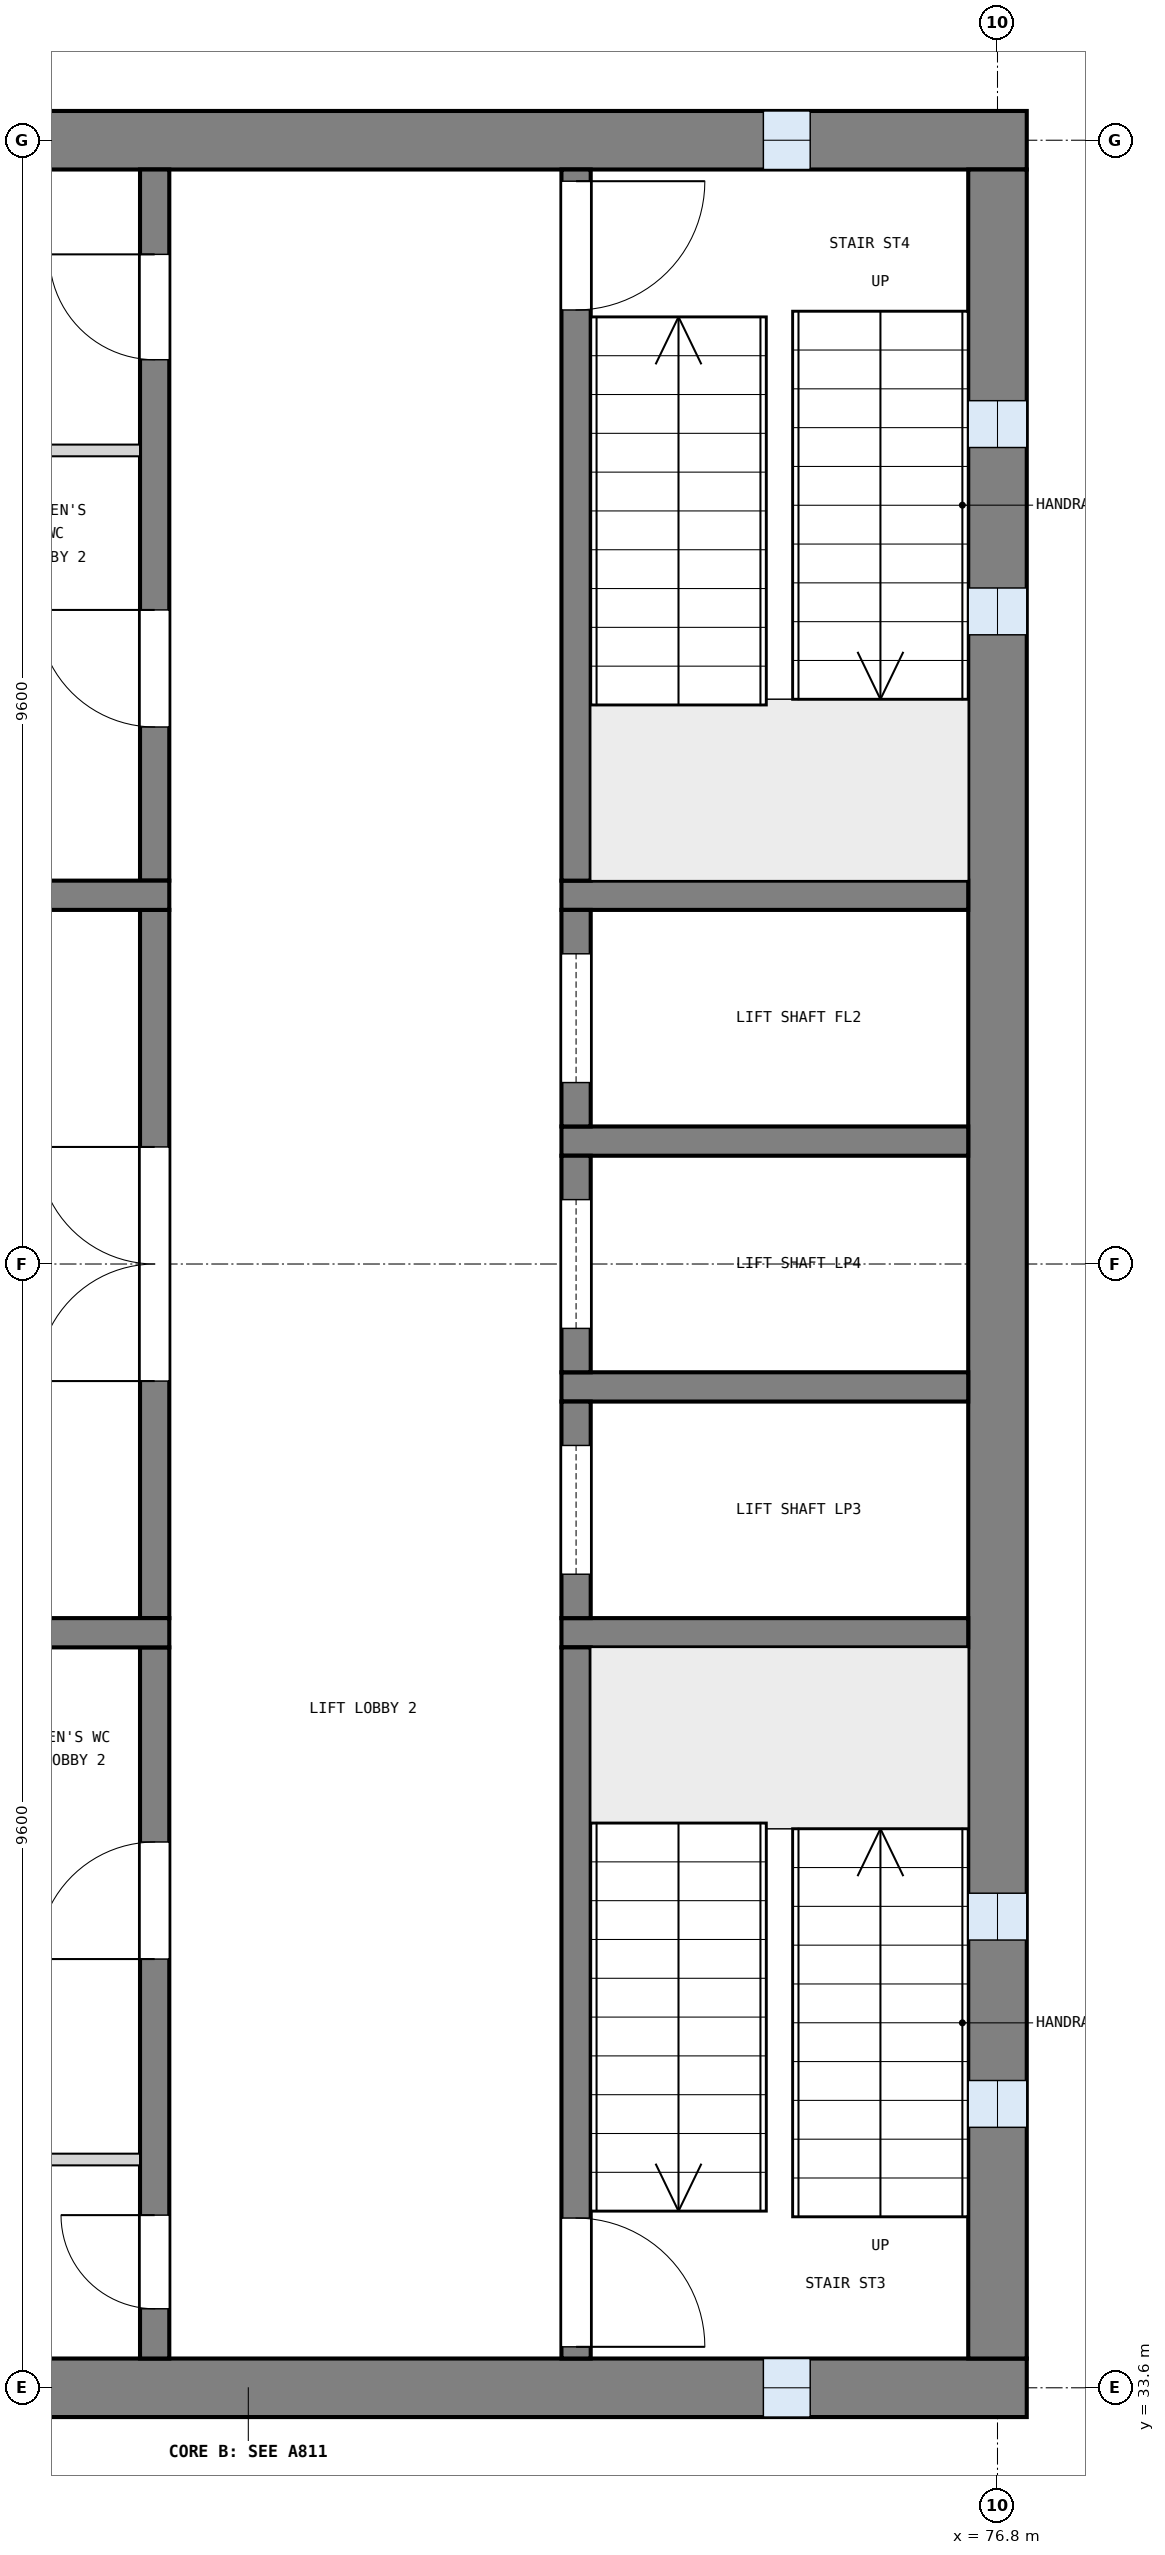
"""IFC4 building model, lengths in metres.
Left out: names, types, materials, properties, quantities, classifications, styles, units other than length and angle.
Written with IfcOpenShell. Run it as: python <this file> out.ifc"""

import sys

from ifc_helpers import new_model, si_unit, direction, frame, frame_2d, origin, place, context, subcontext, project, spatial, rectangle, extrude, element, fill, save


model = new_model("IFC4")
c1 = context("Model", 3, precision=1e-05, world=origin(), true_north=direction((0.0, 1.0)))
c2 = subcontext(c1, "Body", "Model", "MODEL_VIEW")
j1 = project(units=[si_unit("LENGTHUNIT", "METRE"), si_unit("PLANEANGLEUNIT", "RADIAN")], contexts=[c1])
p1 = place(None, origin())
s1 = spatial("IfcSite", under=j1, at=p1, CompositionType="ELEMENT")
p2 = place(p1, origin())
s2 = spatial("IfcBuilding", under=s1, at=p2, CompositionType="ELEMENT")
p3 = place(p2, frame((0.0, 0.0, 36.6)))
s3 = spatial("IfcBuildingStorey", under=s2, at=p3, CompositionType="ELEMENT", Elevation=36.6)
p4 = place(p3, frame((63.75, 52.8, 0.0), z_axis=(0.0, 0.0, 1.0), x_axis=(1.0, 0.0, 0.0)))
e1 = element("IfcWall", 1, at=p4, inside=s3, PredefinedType="SHEAR", context=c2, shape_type="SweptSolid", body=[
    extrude(rectangle(XDim=13.3, YDim=0.5, at=frame_2d((6.65, 0.0))), origin(), (0.0, 0.0, 1.0), 3.9),
])
p5 = place(p4, frame((11.05, 0.0, 1.0)))
e2 = element("IfcOpeningElement", 2, at=p5, cuts=e1, PredefinedType="OPENING", context=c2, shape_type="SweptSolid", body=[
    extrude(rectangle(XDim=0.4, YDim=2.0, at=frame_2d((0.2, 1.0))), frame((0.0, 0.26, 0.0), z_axis=(0.0, -1.0, 0.0), x_axis=(1.0, 0.0, 0.0)), (0.0, 0.0, 1.0), 0.52),
])
p6 = place(p3, frame((63.75, 33.6, 0.0), z_axis=(0.0, 0.0, 1.0), x_axis=(1.0, 0.0, 0.0)))
e3 = element("IfcWall", 3, at=p6, inside=s3, PredefinedType="SHEAR", context=c2, shape_type="SweptSolid", body=[
    extrude(rectangle(XDim=13.3, YDim=0.5, at=frame_2d((6.65, 0.0))), origin(), (0.0, 0.0, 1.0), 3.9),
])
p7 = place(p6, frame((11.05, 0.0, 1.0)))
e4 = element("IfcOpeningElement", 4, at=p7, cuts=e3, PredefinedType="OPENING", context=c2, shape_type="SweptSolid", body=[
    extrude(rectangle(XDim=0.4, YDim=2.0, at=frame_2d((0.2, 1.0))), frame((0.0, 0.26, 0.0), z_axis=(0.0, -1.0, 0.0), x_axis=(1.0, 0.0, 0.0)), (0.0, 0.0, 1.0), 0.52),
])
p8 = place(p3, frame((76.8, 33.85, 0.0), z_axis=(0.0, 0.0, 1.0), x_axis=(0.0, 1.0, 0.0)))
e5 = element("IfcWall", 5, at=p8, inside=s3, PredefinedType="SHEAR", context=c2, shape_type="SweptSolid", body=[
    extrude(rectangle(XDim=18.7, YDim=0.5, at=frame_2d((9.35, 0.0))), origin(), (0.0, 0.0, 1.0), 3.9),
])
p9 = place(p8, frame((1.975, 0.0, 1.0)))
e6 = element("IfcOpeningElement", 6, at=p9, cuts=e5, PredefinedType="OPENING", context=c2, shape_type="SweptSolid", body=[
    extrude(rectangle(XDim=0.4, YDim=2.0, at=frame_2d((0.2, 1.0))), frame((0.0, 0.26, 0.0), z_axis=(0.0, -1.0, 0.0), x_axis=(1.0, 0.0, 0.0)), (0.0, 0.0, 1.0), 0.52),
])
p10 = place(p8, frame((3.575, 0.0, 1.0)))
e7 = element("IfcOpeningElement", 7, at=p10, cuts=e5, PredefinedType="OPENING", context=c2, shape_type="SweptSolid", body=[
    extrude(rectangle(XDim=0.4, YDim=2.0, at=frame_2d((0.2, 1.0))), frame((0.0, 0.26, 0.0), z_axis=(0.0, -1.0, 0.0), x_axis=(1.0, 0.0, 0.0)), (0.0, 0.0, 1.0), 0.52),
])
p11 = place(p8, frame((14.725, 0.0, 1.0)))
e8 = element("IfcOpeningElement", 8, at=p11, cuts=e5, PredefinedType="OPENING", context=c2, shape_type="SweptSolid", body=[
    extrude(rectangle(XDim=0.4, YDim=2.0, at=frame_2d((0.2, 1.0))), frame((0.0, 0.26, 0.0), z_axis=(0.0, -1.0, 0.0), x_axis=(1.0, 0.0, 0.0)), (0.0, 0.0, 1.0), 0.52),
])
p12 = place(p8, frame((16.325, 0.0, 1.0)))
e9 = element("IfcOpeningElement", 9, at=p12, cuts=e5, PredefinedType="OPENING", context=c2, shape_type="SweptSolid", body=[
    extrude(rectangle(XDim=0.4, YDim=2.0, at=frame_2d((0.2, 1.0))), frame((0.0, 0.26, 0.0), z_axis=(0.0, -1.0, 0.0), x_axis=(1.0, 0.0, 0.0)), (0.0, 0.0, 1.0), 0.52),
])
for number, where, z_axis, x_axis in (
    (10, (76.55, 40.05, 0.0), (0.0, 0.0, 1.0), (-1.0, 0.0, 0.0)),
    (11, (76.55, 42.15, 0.0), (0.0, 0.0, 1.0), (-1.0, 0.0, 0.0)),
    (12, (76.55, 44.25, 0.0), (0.0, 0.0, 1.0), (-1.0, 0.0, 0.0)),
    (13, (76.55, 46.35, 0.0), (0.0, 0.0, 1.0), (-1.0, 0.0, 0.0)),
):
    element("IfcWall", number, at=place(p3, frame(where, z_axis=z_axis, x_axis=x_axis)), inside=s3, PredefinedType="SOLIDWALL", context=c2, shape_type="SweptSolid", body=[
        extrude(rectangle(XDim=3.475, YDim=0.25, at=frame_2d((1.738, 0.0))), origin(), (0.0, 0.0, 1.0), 3.6),
    ])
p13 = place(p3, frame((73.2, 33.85, 0.0), z_axis=(0.0, 0.0, 1.0), x_axis=(0.0, 1.0, 0.0)))
e14 = element("IfcWall", 14, at=p13, inside=s3, PredefinedType="SOLIDWALL", context=c2, shape_type="SweptSolid", body=[
    extrude(rectangle(XDim=6.075, YDim=0.25, at=frame_2d((3.038, 0.0))), origin(), (0.0, 0.0, 1.0), 3.6),
])
p14 = place(p13, frame((0.1, 0.0, 0.0)))
e15 = element("IfcOpeningElement", 15, at=p14, cuts=e14, PredefinedType="OPENING", context=c2, shape_type="SweptSolid", body=[
    extrude(rectangle(XDim=1.1, YDim=2.1, at=frame_2d((0.55, 1.05))), frame((0.0, 0.135, 0.0), z_axis=(0.0, -1.0, 0.0), x_axis=(1.0, 0.0, 0.0)), (0.0, 0.0, 1.0), 0.27),
])
p15 = place(p3, frame((73.2, 40.175, 0.0), z_axis=(0.0, 0.0, 1.0), x_axis=(0.0, 1.0, 0.0)))
e16 = element("IfcWall", 16, at=p15, inside=s3, PredefinedType="SOLIDWALL", context=c2, shape_type="SweptSolid", body=[
    extrude(rectangle(XDim=1.85, YDim=0.25, at=frame_2d((0.925, 0.0))), origin(), (0.0, 0.0, 1.0), 3.6),
])
p16 = place(p15, frame((0.375, 0.0, 0.0)))
e17 = element("IfcOpeningElement", 17, at=p16, cuts=e16, PredefinedType="OPENING", context=c2, shape_type="SweptSolid", body=[
    extrude(rectangle(XDim=1.1, YDim=2.1, at=frame_2d((0.55, 1.05))), frame((0.0, 0.135, 0.0), z_axis=(0.0, -1.0, 0.0), x_axis=(1.0, 0.0, 0.0)), (0.0, 0.0, 1.0), 0.27),
])
p17 = place(p3, frame((73.2, 42.275, 0.0), z_axis=(0.0, 0.0, 1.0), x_axis=(0.0, 1.0, 0.0)))
e18 = element("IfcWall", 18, at=p17, inside=s3, PredefinedType="SOLIDWALL", context=c2, shape_type="SweptSolid", body=[
    extrude(rectangle(XDim=1.85, YDim=0.25, at=frame_2d((0.925, 0.0))), origin(), (0.0, 0.0, 1.0), 3.6),
])
p18 = place(p17, frame((0.375, 0.0, 0.0)))
e19 = element("IfcOpeningElement", 19, at=p18, cuts=e18, PredefinedType="OPENING", context=c2, shape_type="SweptSolid", body=[
    extrude(rectangle(XDim=1.1, YDim=2.1, at=frame_2d((0.55, 1.05))), frame((0.0, 0.135, 0.0), z_axis=(0.0, -1.0, 0.0), x_axis=(1.0, 0.0, 0.0)), (0.0, 0.0, 1.0), 0.27),
])
p19 = place(p3, frame((73.2, 44.375, 0.0), z_axis=(0.0, 0.0, 1.0), x_axis=(0.0, 1.0, 0.0)))
e20 = element("IfcWall", 20, at=p19, inside=s3, PredefinedType="SOLIDWALL", context=c2, shape_type="SweptSolid", body=[
    extrude(rectangle(XDim=1.85, YDim=0.25, at=frame_2d((0.925, 0.0))), origin(), (0.0, 0.0, 1.0), 3.6),
])
p20 = place(p19, frame((0.375, 0.0, 0.0)))
e21 = element("IfcOpeningElement", 21, at=p20, cuts=e20, PredefinedType="OPENING", context=c2, shape_type="SweptSolid", body=[
    extrude(rectangle(XDim=1.1, YDim=2.1, at=frame_2d((0.55, 1.05))), frame((0.0, 0.135, 0.0), z_axis=(0.0, -1.0, 0.0), x_axis=(1.0, 0.0, 0.0)), (0.0, 0.0, 1.0), 0.27),
])
p21 = place(p3, frame((73.2, 46.475, 0.0), z_axis=(0.0, 0.0, 1.0), x_axis=(0.0, 1.0, 0.0)))
e22 = element("IfcWall", 22, at=p21, inside=s3, PredefinedType="SOLIDWALL", context=c2, shape_type="SweptSolid", body=[
    extrude(rectangle(XDim=6.075, YDim=0.25, at=frame_2d((3.038, 0.0))), origin(), (0.0, 0.0, 1.0), 3.6),
])
p22 = place(p21, frame((4.875, 0.0, 0.0)))
e23 = element("IfcOpeningElement", 23, at=p22, cuts=e22, PredefinedType="OPENING", context=c2, shape_type="SweptSolid", body=[
    extrude(rectangle(XDim=1.1, YDim=2.1, at=frame_2d((0.55, 1.05))), frame((0.0, 0.135, 0.0), z_axis=(0.0, -1.0, 0.0), x_axis=(1.0, 0.0, 0.0)), (0.0, 0.0, 1.0), 0.27),
])
p23 = place(p3, frame((69.6, 33.85, 0.0), z_axis=(0.0, 0.0, 1.0), x_axis=(0.0, 1.0, 0.0)))
e24 = element("IfcWall", 24, at=p23, inside=s3, PredefinedType="SOLIDWALL", context=c2, shape_type="SweptSolid", body=[
    extrude(rectangle(XDim=6.075, YDim=0.25, at=frame_2d((3.038, 0.0))), origin(), (0.0, 0.0, 1.0), 3.6),
])
p24 = place(p23, frame((0.425, 0.0, 0.0)))
e25 = element("IfcOpeningElement", 25, at=p24, cuts=e24, PredefinedType="OPENING", context=c2, shape_type="SweptSolid", body=[
    extrude(rectangle(XDim=0.8, YDim=2.1, at=frame_2d((0.4, 1.05))), frame((0.0, 0.135, 0.0), z_axis=(0.0, -1.0, 0.0), x_axis=(1.0, 0.0, 0.0)), (0.0, 0.0, 1.0), 0.27),
])
p25 = place(p23, frame((3.413, 0.0, 0.0)))
e26 = element("IfcOpeningElement", 26, at=p25, cuts=e24, PredefinedType="OPENING", context=c2, shape_type="SweptSolid", body=[
    extrude(rectangle(XDim=1.0, YDim=2.1, at=frame_2d((0.5, 1.05))), frame((0.0, 0.135, 0.0), z_axis=(0.0, -1.0, 0.0), x_axis=(1.0, 0.0, 0.0)), (0.0, 0.0, 1.0), 0.27),
])
p26 = place(p3, frame((69.6, 40.175, 0.0), z_axis=(0.0, 0.0, 1.0), x_axis=(0.0, 1.0, 0.0)))
e27 = element("IfcWall", 27, at=p26, inside=s3, PredefinedType="SOLIDWALL", context=c2, shape_type="SweptSolid", body=[
    extrude(rectangle(XDim=6.05, YDim=0.25, at=frame_2d((3.025, 0.0))), origin(), (0.0, 0.0, 1.0), 3.6),
])
p27 = place(p26, frame((2.025, 0.0, 0.0)))
e28 = element("IfcOpeningElement", 28, at=p27, cuts=e27, PredefinedType="OPENING", context=c2, shape_type="SweptSolid", body=[
    extrude(rectangle(XDim=2.0, YDim=2.1, at=frame_2d((1.0, 1.05))), frame((0.0, 0.135, 0.0), z_axis=(0.0, -1.0, 0.0), x_axis=(1.0, 0.0, 0.0)), (0.0, 0.0, 1.0), 0.27),
])
p28 = place(p3, frame((69.6, 46.475, 0.0), z_axis=(0.0, 0.0, 1.0), x_axis=(0.0, 1.0, 0.0)))
e29 = element("IfcWall", 29, at=p28, inside=s3, PredefinedType="SOLIDWALL", context=c2, shape_type="SweptSolid", body=[
    extrude(rectangle(XDim=6.075, YDim=0.25, at=frame_2d((3.038, 0.0))), origin(), (0.0, 0.0, 1.0), 3.6),
])
p29 = place(p28, frame((1.312, 0.0, 0.0)))
e30 = element("IfcOpeningElement", 30, at=p29, cuts=e29, PredefinedType="OPENING", context=c2, shape_type="SweptSolid", body=[
    extrude(rectangle(XDim=1.0, YDim=2.1, at=frame_2d((0.5, 1.05))), frame((0.0, 0.135, 0.0), z_axis=(0.0, -1.0, 0.0), x_axis=(1.0, 0.0, 0.0)), (0.0, 0.0, 1.0), 0.27),
])
p30 = place(p28, frame((4.45, 0.0, 0.0)))
e31 = element("IfcOpeningElement", 31, at=p30, cuts=e29, PredefinedType="OPENING", context=c2, shape_type="SweptSolid", body=[
    extrude(rectangle(XDim=0.9, YDim=2.1, at=frame_2d((0.45, 1.05))), frame((0.0, 0.135, 0.0), z_axis=(0.0, -1.0, 0.0), x_axis=(1.0, 0.0, 0.0)), (0.0, 0.0, 1.0), 0.27),
])
for number, where, z_axis, x_axis in (
    (32, (69.725, 40.05, 0.0), (0.0, 0.0, 1.0), (-1.0, 0.0, 0.0)),
    (33, (69.725, 46.35, 0.0), (0.0, 0.0, 1.0), (-1.0, 0.0, 0.0)),
):
    element("IfcWall", number, at=place(p3, frame(where, z_axis=z_axis, x_axis=x_axis)), inside=s3, PredefinedType="SOLIDWALL", context=c2, shape_type="SweptSolid", body=[
        extrude(rectangle(XDim=5.475, YDim=0.25, at=frame_2d((2.738, 0.0))), origin(), (0.0, 0.0, 1.0), 3.6),
    ])
for number, where, z_axis, x_axis in (
    (34, (69.475, 35.55, 0.0), (0.0, 0.0, 1.0), (-1.0, 0.0, 0.0)),
    (35, (69.475, 50.15, 0.0), (0.0, 0.0, 1.0), (-1.0, 0.0, 0.0)),
):
    element("IfcWall", number, at=place(p3, frame(where, z_axis=z_axis, x_axis=x_axis)), inside=s3, PredefinedType="PARTITIONING", context=c2, shape_type="SweptSolid", body=[
        extrude(rectangle(XDim=5.225, YDim=0.1, at=frame_2d((2.613, 0.0))), origin(), (0.0, 0.0, 1.0), 3.6),
    ])
p31 = place(p9, origin())
e36 = element("IfcWindow", 36, at=p31, inside=s3, PartitioningType="SINGLE_PANEL", PredefinedType="WINDOW", context=c2, shape_type="SweptSolid", body=[
    extrude(rectangle(XDim=0.4, YDim=2.0, at=frame_2d((0.2, 1.0))), frame((0.0, 0.03, 0.0), z_axis=(0.0, -1.0, 0.0), x_axis=(1.0, 0.0, 0.0)), (0.0, 0.0, 1.0), 0.06),
])
fill(e6, e36)
p32 = place(p10, origin())
e37 = element("IfcWindow", 37, at=p32, inside=s3, PartitioningType="SINGLE_PANEL", PredefinedType="WINDOW", context=c2, shape_type="SweptSolid", body=[
    extrude(rectangle(XDim=0.4, YDim=2.0, at=frame_2d((0.2, 1.0))), frame((0.0, 0.03, 0.0), z_axis=(0.0, -1.0, 0.0), x_axis=(1.0, 0.0, 0.0)), (0.0, 0.0, 1.0), 0.06),
])
fill(e7, e37)
p33 = place(p11, origin())
e38 = element("IfcWindow", 38, at=p33, inside=s3, PartitioningType="SINGLE_PANEL", PredefinedType="WINDOW", context=c2, shape_type="SweptSolid", body=[
    extrude(rectangle(XDim=0.4, YDim=2.0, at=frame_2d((0.2, 1.0))), frame((0.0, 0.03, 0.0), z_axis=(0.0, -1.0, 0.0), x_axis=(1.0, 0.0, 0.0)), (0.0, 0.0, 1.0), 0.06),
])
fill(e8, e38)
p34 = place(p12, origin())
e39 = element("IfcWindow", 39, at=p34, inside=s3, PartitioningType="SINGLE_PANEL", PredefinedType="WINDOW", context=c2, shape_type="SweptSolid", body=[
    extrude(rectangle(XDim=0.4, YDim=2.0, at=frame_2d((0.2, 1.0))), frame((0.0, 0.03, 0.0), z_axis=(0.0, -1.0, 0.0), x_axis=(1.0, 0.0, 0.0)), (0.0, 0.0, 1.0), 0.06),
])
fill(e9, e39)
p35 = place(p7, origin())
e40 = element("IfcWindow", 40, at=p35, inside=s3, PartitioningType="SINGLE_PANEL", PredefinedType="WINDOW", context=c2, shape_type="SweptSolid", body=[
    extrude(rectangle(XDim=0.4, YDim=2.0, at=frame_2d((0.2, 1.0))), frame((0.0, 0.03, 0.0), z_axis=(0.0, -1.0, 0.0), x_axis=(1.0, 0.0, 0.0)), (0.0, 0.0, 1.0), 0.06),
])
fill(e4, e40)
p36 = place(p5, origin())
e41 = element("IfcWindow", 41, at=p36, inside=s3, PartitioningType="SINGLE_PANEL", PredefinedType="WINDOW", context=c2, shape_type="SweptSolid", body=[
    extrude(rectangle(XDim=0.4, YDim=2.0, at=frame_2d((0.2, 1.0))), frame((0.0, 0.03, 0.0), z_axis=(0.0, -1.0, 0.0), x_axis=(1.0, 0.0, 0.0)), (0.0, 0.0, 1.0), 0.06),
])
fill(e2, e41)
p37 = place(p14, frame((1.1, 0.0, 0.0), z_axis=(0.0, 0.0, 1.0), x_axis=(-1.0, 0.0, 0.0)))
e42 = element("IfcDoor", 42, at=p37, inside=s3, OperationType="SINGLE_SWING_RIGHT", PredefinedType="DOOR", context=c2, shape_type="SweptSolid", body=[
    extrude(rectangle(XDim=1.1, YDim=2.1, at=frame_2d((0.55, 1.05))), frame((0.0, 0.025, 0.0), z_axis=(0.0, -1.0, 0.0), x_axis=(1.0, 0.0, 0.0)), (0.0, 0.0, 1.0), 0.05),
])
fill(e15, e42)
p38 = place(p22, frame((1.1, 0.0, 0.0), z_axis=(0.0, 0.0, 1.0), x_axis=(-1.0, 0.0, 0.0)))
e43 = element("IfcDoor", 43, at=p38, inside=s3, OperationType="SINGLE_SWING_LEFT", PredefinedType="DOOR", context=c2, shape_type="SweptSolid", body=[
    extrude(rectangle(XDim=1.1, YDim=2.1, at=frame_2d((0.55, 1.05))), frame((0.0, 0.025, 0.0), z_axis=(0.0, -1.0, 0.0), x_axis=(1.0, 0.0, 0.0)), (0.0, 0.0, 1.0), 0.05),
])
fill(e23, e43)
p39 = place(p16, origin())
e44 = element("IfcDoor", 44, at=p39, inside=s3, OperationType="SLIDING_TO_LEFT", PredefinedType="DOOR", context=c2, shape_type="SweptSolid", body=[
    extrude(rectangle(XDim=1.1, YDim=2.1, at=frame_2d((0.55, 1.05))), frame((0.0, 0.025, 0.0), z_axis=(0.0, -1.0, 0.0), x_axis=(1.0, 0.0, 0.0)), (0.0, 0.0, 1.0), 0.05),
])
fill(e17, e44)
p40 = place(p18, origin())
e45 = element("IfcDoor", 45, at=p40, inside=s3, OperationType="SLIDING_TO_LEFT", PredefinedType="DOOR", context=c2, shape_type="SweptSolid", body=[
    extrude(rectangle(XDim=1.1, YDim=2.1, at=frame_2d((0.55, 1.05))), frame((0.0, 0.025, 0.0), z_axis=(0.0, -1.0, 0.0), x_axis=(1.0, 0.0, 0.0)), (0.0, 0.0, 1.0), 0.05),
])
fill(e19, e45)
p41 = place(p20, origin())
e46 = element("IfcDoor", 46, at=p41, inside=s3, OperationType="SLIDING_TO_LEFT", PredefinedType="DOOR", context=c2, shape_type="SweptSolid", body=[
    extrude(rectangle(XDim=1.1, YDim=2.1, at=frame_2d((0.55, 1.05))), frame((0.0, 0.025, 0.0), z_axis=(0.0, -1.0, 0.0), x_axis=(1.0, 0.0, 0.0)), (0.0, 0.0, 1.0), 0.05),
])
fill(e21, e46)
p42 = place(p27, origin())
e47 = element("IfcDoor", 47, at=p42, inside=s3, OperationType="DOUBLE_DOOR_SINGLE_SWING", PredefinedType="DOOR", context=c2, shape_type="SweptSolid", body=[
    extrude(rectangle(XDim=2.0, YDim=2.1, at=frame_2d((1.0, 1.05))), frame((0.0, 0.025, 0.0), z_axis=(0.0, -1.0, 0.0), x_axis=(1.0, 0.0, 0.0)), (0.0, 0.0, 1.0), 0.05),
])
fill(e28, e47)
p43 = place(p24, origin())
e48 = element("IfcDoor", 48, at=p43, inside=s3, OperationType="SINGLE_SWING_RIGHT", PredefinedType="DOOR", context=c2, shape_type="SweptSolid", body=[
    extrude(rectangle(XDim=0.8, YDim=2.1, at=frame_2d((0.4, 1.05))), frame((0.0, 0.025, 0.0), z_axis=(0.0, -1.0, 0.0), x_axis=(1.0, 0.0, 0.0)), (0.0, 0.0, 1.0), 0.05),
])
fill(e25, e48)
p44 = place(p25, origin())
e49 = element("IfcDoor", 49, at=p44, inside=s3, OperationType="SINGLE_SWING_LEFT", PredefinedType="DOOR", context=c2, shape_type="SweptSolid", body=[
    extrude(rectangle(XDim=1.0, YDim=2.1, at=frame_2d((0.5, 1.05))), frame((0.0, 0.025, 0.0), z_axis=(0.0, -1.0, 0.0), x_axis=(1.0, 0.0, 0.0)), (0.0, 0.0, 1.0), 0.05),
])
fill(e26, e49)
p45 = place(p29, origin())
e50 = element("IfcDoor", 50, at=p45, inside=s3, OperationType="SINGLE_SWING_RIGHT", PredefinedType="DOOR", context=c2, shape_type="SweptSolid", body=[
    extrude(rectangle(XDim=1.0, YDim=2.1, at=frame_2d((0.5, 1.05))), frame((0.0, 0.025, 0.0), z_axis=(0.0, -1.0, 0.0), x_axis=(1.0, 0.0, 0.0)), (0.0, 0.0, 1.0), 0.05),
])
fill(e30, e50)
p46 = place(p30, origin())
e51 = element("IfcDoor", 51, at=p46, inside=s3, OperationType="SINGLE_SWING_RIGHT", PredefinedType="DOOR", context=c2, shape_type="SweptSolid", body=[
    extrude(rectangle(XDim=0.9, YDim=2.1, at=frame_2d((0.45, 1.05))), frame((0.0, 0.025, 0.0), z_axis=(0.0, -1.0, 0.0), x_axis=(1.0, 0.0, 0.0)), (0.0, 0.0, 1.0), 0.05),
])
fill(e31, e51)
save(model, sys.argv[1])
